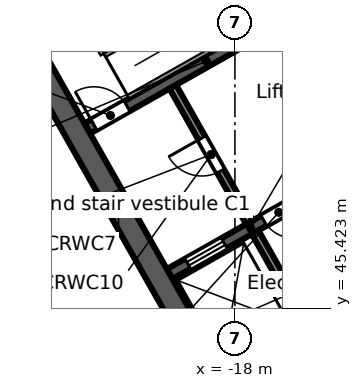
"""IFC4 building model, lengths in metres.
Left out: names, types, materials, properties, quantities, classifications, styles, units other than length and angle.
Written with IfcOpenShell. Run it as: python <this file> out.ifc"""

import sys

from ifc_helpers import new_model, si_unit, direction, frame, frame_2d, origin, place, context, subcontext, project, spatial, rectangle, extrude, element, fill, save


model = new_model("IFC4")
c1 = context("Model", 3, precision=1e-05, world=origin(), true_north=direction((0.0, 1.0)))
c2 = subcontext(c1, "Body", "Model", "MODEL_VIEW")
j1 = project(units=[si_unit("LENGTHUNIT", "METRE"), si_unit("PLANEANGLEUNIT", "RADIAN")], contexts=[c1])
p1 = place(None, origin())
s1 = spatial("IfcSite", under=j1, at=p1, CompositionType="ELEMENT")
p2 = place(p1, origin())
s2 = spatial("IfcBuilding", under=s1, at=p2, CompositionType="ELEMENT")
p3 = place(p2, frame((0.0, 0.0, 51.5)))
s3 = spatial("IfcBuildingStorey", under=s2, at=p3, CompositionType="ELEMENT", Elevation=51.5)
p4 = place(p3, frame((-58.745, 38.764, 0.0), z_axis=(0.0, 0.0, 1.0), x_axis=(0.870355811726, 0.492423355453, 0.0)))
e1 = element("IfcWall", 1, at=p4, inside=s3, PredefinedType="STANDARD", context=c2, shape_type="SweptSolid", body=[
    extrude(rectangle(XDim=64.025, YDim=0.3, at=frame_2d((32.013, 0.0))), origin(), (0.0, 0.0, 1.0), 4.68),
])
p5 = place(p4, frame((60.122, 0.0, 0.6)))
e2 = element("IfcOpeningElement", 2, at=p5, cuts=e1, PredefinedType="OPENING", context=c2, shape_type="SweptSolid", body=[
    extrude(rectangle(XDim=0.9, YDim=3.2, at=frame_2d((0.45, 1.6))), frame((0.0, 0.16, 0.0), z_axis=(0.0, -1.0, 0.0), x_axis=(1.0, 0.0, 0.0)), (0.0, 0.0, 1.0), 0.32),
])
p6 = place(p4, frame((50.992, 0.0, 0.6)))
e3 = element("IfcOpeningElement", 3, at=p6, cuts=e1, PredefinedType="OPENING", context=c2, shape_type="SweptSolid", body=[
    extrude(rectangle(XDim=0.9, YDim=3.2, at=frame_2d((0.45, 1.6))), frame((0.0, 0.16, 0.0), z_axis=(0.0, -1.0, 0.0), x_axis=(1.0, 0.0, 0.0)), (0.0, 0.0, 1.0), 0.32),
])
p7 = place(p4, frame((41.862, 0.0, 0.6)))
e4 = element("IfcOpeningElement", 4, at=p7, cuts=e1, PredefinedType="OPENING", context=c2, shape_type="SweptSolid", body=[
    extrude(rectangle(XDim=0.9, YDim=3.2, at=frame_2d((0.45, 1.6))), frame((0.0, 0.16, 0.0), z_axis=(0.0, -1.0, 0.0), x_axis=(1.0, 0.0, 0.0)), (0.0, 0.0, 1.0), 0.32),
])
p8 = place(p4, frame((32.732, 0.0, 0.6)))
e5 = element("IfcOpeningElement", 5, at=p8, cuts=e1, PredefinedType="OPENING", context=c2, shape_type="SweptSolid", body=[
    extrude(rectangle(XDim=0.9, YDim=3.2, at=frame_2d((0.45, 1.6))), frame((0.0, 0.16, 0.0), z_axis=(0.0, -1.0, 0.0), x_axis=(1.0, 0.0, 0.0)), (0.0, 0.0, 1.0), 0.32),
])
p9 = place(p4, frame((23.602, 0.0, 0.6)))
e6 = element("IfcOpeningElement", 6, at=p9, cuts=e1, PredefinedType="OPENING", context=c2, shape_type="SweptSolid", body=[
    extrude(rectangle(XDim=0.9, YDim=3.2, at=frame_2d((0.45, 1.6))), frame((0.0, 0.16, 0.0), z_axis=(0.0, -1.0, 0.0), x_axis=(1.0, 0.0, 0.0)), (0.0, 0.0, 1.0), 0.32),
])
p10 = place(p4, frame((14.472, 0.0, 0.6)))
e7 = element("IfcOpeningElement", 7, at=p10, cuts=e1, PredefinedType="OPENING", context=c2, shape_type="SweptSolid", body=[
    extrude(rectangle(XDim=0.9, YDim=3.2, at=frame_2d((0.45, 1.6))), frame((0.0, 0.16, 0.0), z_axis=(0.0, -1.0, 0.0), x_axis=(1.0, 0.0, 0.0)), (0.0, 0.0, 1.0), 0.32),
])
p11 = place(p4, frame((5.342, 0.0, 0.6)))
e8 = element("IfcOpeningElement", 8, at=p11, cuts=e1, PredefinedType="OPENING", context=c2, shape_type="SweptSolid", body=[
    extrude(rectangle(XDim=0.9, YDim=3.2, at=frame_2d((0.45, 1.6))), frame((0.0, 0.16, 0.0), z_axis=(0.0, -1.0, 0.0), x_axis=(1.0, 0.0, 0.0)), (0.0, 0.0, 1.0), 0.32),
])
p12 = place(p3, frame((-0.055, 47.969, 0.0), z_axis=(0.0, 0.0, 1.0), x_axis=(-0.870355730478, -0.492423499058, 0.0)))
e9 = element("IfcWall", 9, at=p12, inside=s3, PredefinedType="STANDARD", context=c2, shape_type="SweptSolid", body=[
    extrude(rectangle(XDim=43.75, YDim=0.3, at=frame_2d((21.875, 0.0))), origin(), (0.0, 0.0, 1.0), 4.68),
])
p13 = place(p12, frame((39.977, 0.0, 0.6)))
e10 = element("IfcOpeningElement", 10, at=p13, cuts=e9, PredefinedType="OPENING", context=c2, shape_type="SweptSolid", body=[
    extrude(rectangle(XDim=0.9, YDim=3.2, at=frame_2d((0.45, 1.6))), frame((0.0, 0.16, 0.0), z_axis=(0.0, -1.0, 0.0), x_axis=(1.0, 0.0, 0.0)), (0.0, 0.0, 1.0), 0.32),
])
p14 = place(p12, frame((31.222, 0.0, 0.6)))
e11 = element("IfcOpeningElement", 11, at=p14, cuts=e9, PredefinedType="OPENING", context=c2, shape_type="SweptSolid", body=[
    extrude(rectangle(XDim=0.9, YDim=3.2, at=frame_2d((0.45, 1.6))), frame((0.0, 0.16, 0.0), z_axis=(0.0, -1.0, 0.0), x_axis=(1.0, 0.0, 0.0)), (0.0, 0.0, 1.0), 0.32),
])
p15 = place(p12, frame((22.468, 0.0, 0.6)))
e12 = element("IfcOpeningElement", 12, at=p15, cuts=e9, PredefinedType="OPENING", context=c2, shape_type="SweptSolid", body=[
    extrude(rectangle(XDim=0.9, YDim=3.2, at=frame_2d((0.45, 1.6))), frame((0.0, 0.16, 0.0), z_axis=(0.0, -1.0, 0.0), x_axis=(1.0, 0.0, 0.0)), (0.0, 0.0, 1.0), 0.32),
])
p16 = place(p12, frame((13.713, 0.0, 0.6)))
e13 = element("IfcOpeningElement", 13, at=p16, cuts=e9, PredefinedType="OPENING", context=c2, shape_type="SweptSolid", body=[
    extrude(rectangle(XDim=0.9, YDim=3.2, at=frame_2d((0.45, 1.6))), frame((0.0, 0.16, 0.0), z_axis=(0.0, -1.0, 0.0), x_axis=(1.0, 0.0, 0.0)), (0.0, 0.0, 1.0), 0.32),
])
p17 = place(p12, frame((4.959, 0.0, 0.6)))
e14 = element("IfcOpeningElement", 14, at=p17, cuts=e9, PredefinedType="OPENING", context=c2, shape_type="SweptSolid", body=[
    extrude(rectangle(XDim=0.9, YDim=3.2, at=frame_2d((0.45, 1.6))), frame((0.0, 0.16, 0.0), z_axis=(0.0, -1.0, 0.0), x_axis=(1.0, 0.0, 0.0)), (0.0, 0.0, 1.0), 0.32),
])
p18 = place(p3, frame((-18.024, 42.104, 0.0), z_axis=(0.0, 0.0, 1.0), x_axis=(0.870360574057, 0.492414937962, 0.0)))
e15 = element("IfcWall", 15, at=p18, inside=s3, PredefinedType="SOLIDWALL", context=c2, shape_type="SweptSolid", body=[
    extrude(rectangle(XDim=15.0, YDim=0.6, at=frame_2d((7.5, 0.0))), origin(), (0.0, 0.0, 1.0), 4.68),
])
p19 = place(p18, frame((6.1, 0.0, 0.0)))
e16 = element("IfcOpeningElement", 16, at=p19, cuts=e15, PredefinedType="OPENING", context=c2, shape_type="SweptSolid", body=[
    extrude(rectangle(XDim=1.2, YDim=2.1, at=frame_2d((0.6, 1.05))), frame((0.0, 0.31, 0.0), z_axis=(0.0, -1.0, 0.0), x_axis=(1.0, 0.0, 0.0)), (0.0, 0.0, 1.0), 0.62),
])
p20 = place(p3, frame((-19.718, 46.316, 0.0), z_axis=(0.0, 0.0, 1.0), x_axis=(0.870353963862, 0.492426621528, 0.0)))
e17 = element("IfcWall", 17, at=p20, inside=s3, PredefinedType="SOLIDWALL", context=c2, shape_type="SweptSolid", body=[
    extrude(rectangle(XDim=4.9, YDim=0.3, at=frame_2d((2.45, 0.0))), origin(), (0.0, 0.0, 1.0), 4.68),
])
p21 = place(p20, frame((0.55, 0.0, 0.0)))
e18 = element("IfcOpeningElement", 18, at=p21, cuts=e17, PredefinedType="OPENING", context=c2, shape_type="SweptSolid", body=[
    extrude(rectangle(XDim=1.1, YDim=2.1, at=frame_2d((0.55, 1.05))), frame((0.0, 0.16, 0.0), z_axis=(0.0, -1.0, 0.0), x_axis=(1.0, 0.0, 0.0)), (0.0, 0.0, 1.0), 0.32),
])
p22 = place(p20, frame((2.85, 0.0, 0.0)))
e19 = element("IfcOpeningElement", 19, at=p22, cuts=e17, PredefinedType="OPENING", context=c2, shape_type="SweptSolid", body=[
    extrude(rectangle(XDim=0.9, YDim=2.1, at=frame_2d((0.45, 1.05))), frame((0.0, 0.16, 0.0), z_axis=(0.0, -1.0, 0.0), x_axis=(1.0, 0.0, 0.0)), (0.0, 0.0, 1.0), 0.32),
])
p23 = place(p3, frame((-21.885, 50.146, 0.0), z_axis=(0.0, 0.0, 1.0), x_axis=(0.870359411463, 0.492416992881, 0.0)))
e20 = element("IfcWall", 20, at=p23, inside=s3, PredefinedType="SOLIDWALL", context=c2, shape_type="SweptSolid", body=[
    extrude(rectangle(XDim=7.2, YDim=0.3, at=frame_2d((3.6, 0.0))), origin(), (0.0, 0.0, 1.0), 4.68),
])
p24 = place(p23, frame((0.2, 0.0, 0.0)))
e21 = element("IfcOpeningElement", 21, at=p24, cuts=e20, PredefinedType="OPENING", context=c2, shape_type="SweptSolid", body=[
    extrude(rectangle(XDim=1.0, YDim=2.1, at=frame_2d((0.5, 1.05))), frame((0.0, 0.16, 0.0), z_axis=(0.0, -1.0, 0.0), x_axis=(1.0, 0.0, 0.0)), (0.0, 0.0, 1.0), 0.32),
])
p25 = place(p3, frame((-24.214, 53.654, 0.0), z_axis=(0.0, 0.0, 1.0), x_axis=(0.492441221355, -0.870345703448, 0.0)))
e22 = element("IfcWall", 22, at=p25, inside=s3, PredefinedType="SOLIDWALL", context=c2, shape_type="SweptSolid", body=[
    extrude(rectangle(XDim=12.8, YDim=0.6, at=frame_2d((6.4, 0.0))), origin(), (0.0, 0.0, 1.0), 4.68),
])
p26 = place(p3, frame((-17.469, 47.417, 0.0), z_axis=(0.0, 0.0, 1.0), x_axis=(0.492440575896, -0.870346068648, 0.0)))
e23 = element("IfcWall", 23, at=p26, inside=s3, PredefinedType="SOLIDWALL", context=c2, shape_type="SweptSolid", body=[
    extrude(rectangle(XDim=4.05, YDim=0.2, at=frame_2d((2.025, 0.0))), origin(), (0.0, 0.0, 1.0), 4.68),
])
p27 = place(p3, frame((-19.635, 51.246, 0.0), z_axis=(0.0, 0.0, 1.0), x_axis=(0.492408451753, -0.87036424366, 0.0)))
e24 = element("IfcWall", 24, at=p27, inside=s3, PredefinedType="PARTITIONING", context=c2, shape_type="SweptSolid", body=[
    extrude(rectangle(XDim=4.1, YDim=0.2, at=frame_2d((2.05, 0.0))), origin(), (0.0, 0.0, 1.0), 4.68),
])
p28 = place(p27, frame((1.55, 0.0, 0.0)))
e25 = element("IfcOpeningElement", 25, at=p28, cuts=e24, PredefinedType="OPENING", context=c2, shape_type="SweptSolid", body=[
    extrude(rectangle(XDim=1.0, YDim=2.1, at=frame_2d((0.5, 1.05))), frame((0.0, 0.11, 0.0), z_axis=(0.0, -1.0, 0.0), x_axis=(1.0, 0.0, 0.0)), (0.0, 0.0, 1.0), 0.22),
])
p29 = place(p21, origin())
e26 = element("IfcDoor", 26, at=p29, inside=s3, OperationType="DOUBLE_DOOR_SLIDING", PredefinedType="DOOR", context=c2, shape_type="SweptSolid", body=[
    extrude(rectangle(XDim=1.1, YDim=2.1, at=frame_2d((0.55, 1.05))), frame((0.0, 0.025, 0.0), z_axis=(0.0, -1.0, 0.0), x_axis=(1.0, 0.0, 0.0)), (0.0, 0.0, 1.0), 0.05),
])
fill(e18, e26)
p30 = place(p24, origin())
e27 = element("IfcDoor", 27, at=p30, inside=s3, OperationType="SINGLE_SWING_LEFT", PredefinedType="DOOR", context=c2, shape_type="SweptSolid", body=[
    extrude(rectangle(XDim=1.0, YDim=2.1, at=frame_2d((0.5, 1.05))), frame((0.0, 0.025, 0.0), z_axis=(0.0, -1.0, 0.0), x_axis=(1.0, 0.0, 0.0)), (0.0, 0.0, 1.0), 0.05),
])
fill(e21, e27)
p31 = place(p28, frame((1.0, 0.0, 0.0), z_axis=(0.0, 0.0, 1.0), x_axis=(-1.0, 0.0, 0.0)))
e28 = element("IfcDoor", 28, at=p31, inside=s3, OperationType="SINGLE_SWING_RIGHT", PredefinedType="DOOR", context=c2, shape_type="SweptSolid", body=[
    extrude(rectangle(XDim=1.0, YDim=2.1, at=frame_2d((0.5, 1.05))), frame((0.0, 0.025, 0.0), z_axis=(0.0, -1.0, 0.0), x_axis=(1.0, 0.0, 0.0)), (0.0, 0.0, 1.0), 0.05),
])
fill(e25, e28)
p32 = place(p22, frame((0.9, 0.0, 0.0), z_axis=(0.0, 0.0, 1.0), x_axis=(-1.0, 0.0, 0.0)))
e29 = element("IfcDoor", 29, at=p32, inside=s3, OperationType="SINGLE_SWING_LEFT", PredefinedType="DOOR", context=c2, shape_type="SweptSolid", body=[
    extrude(rectangle(XDim=0.9, YDim=2.1, at=frame_2d((0.45, 1.05))), frame((0.0, 0.025, 0.0), z_axis=(0.0, -1.0, 0.0), x_axis=(1.0, 0.0, 0.0)), (0.0, 0.0, 1.0), 0.05),
])
fill(e19, e29)
save(model, sys.argv[1])
